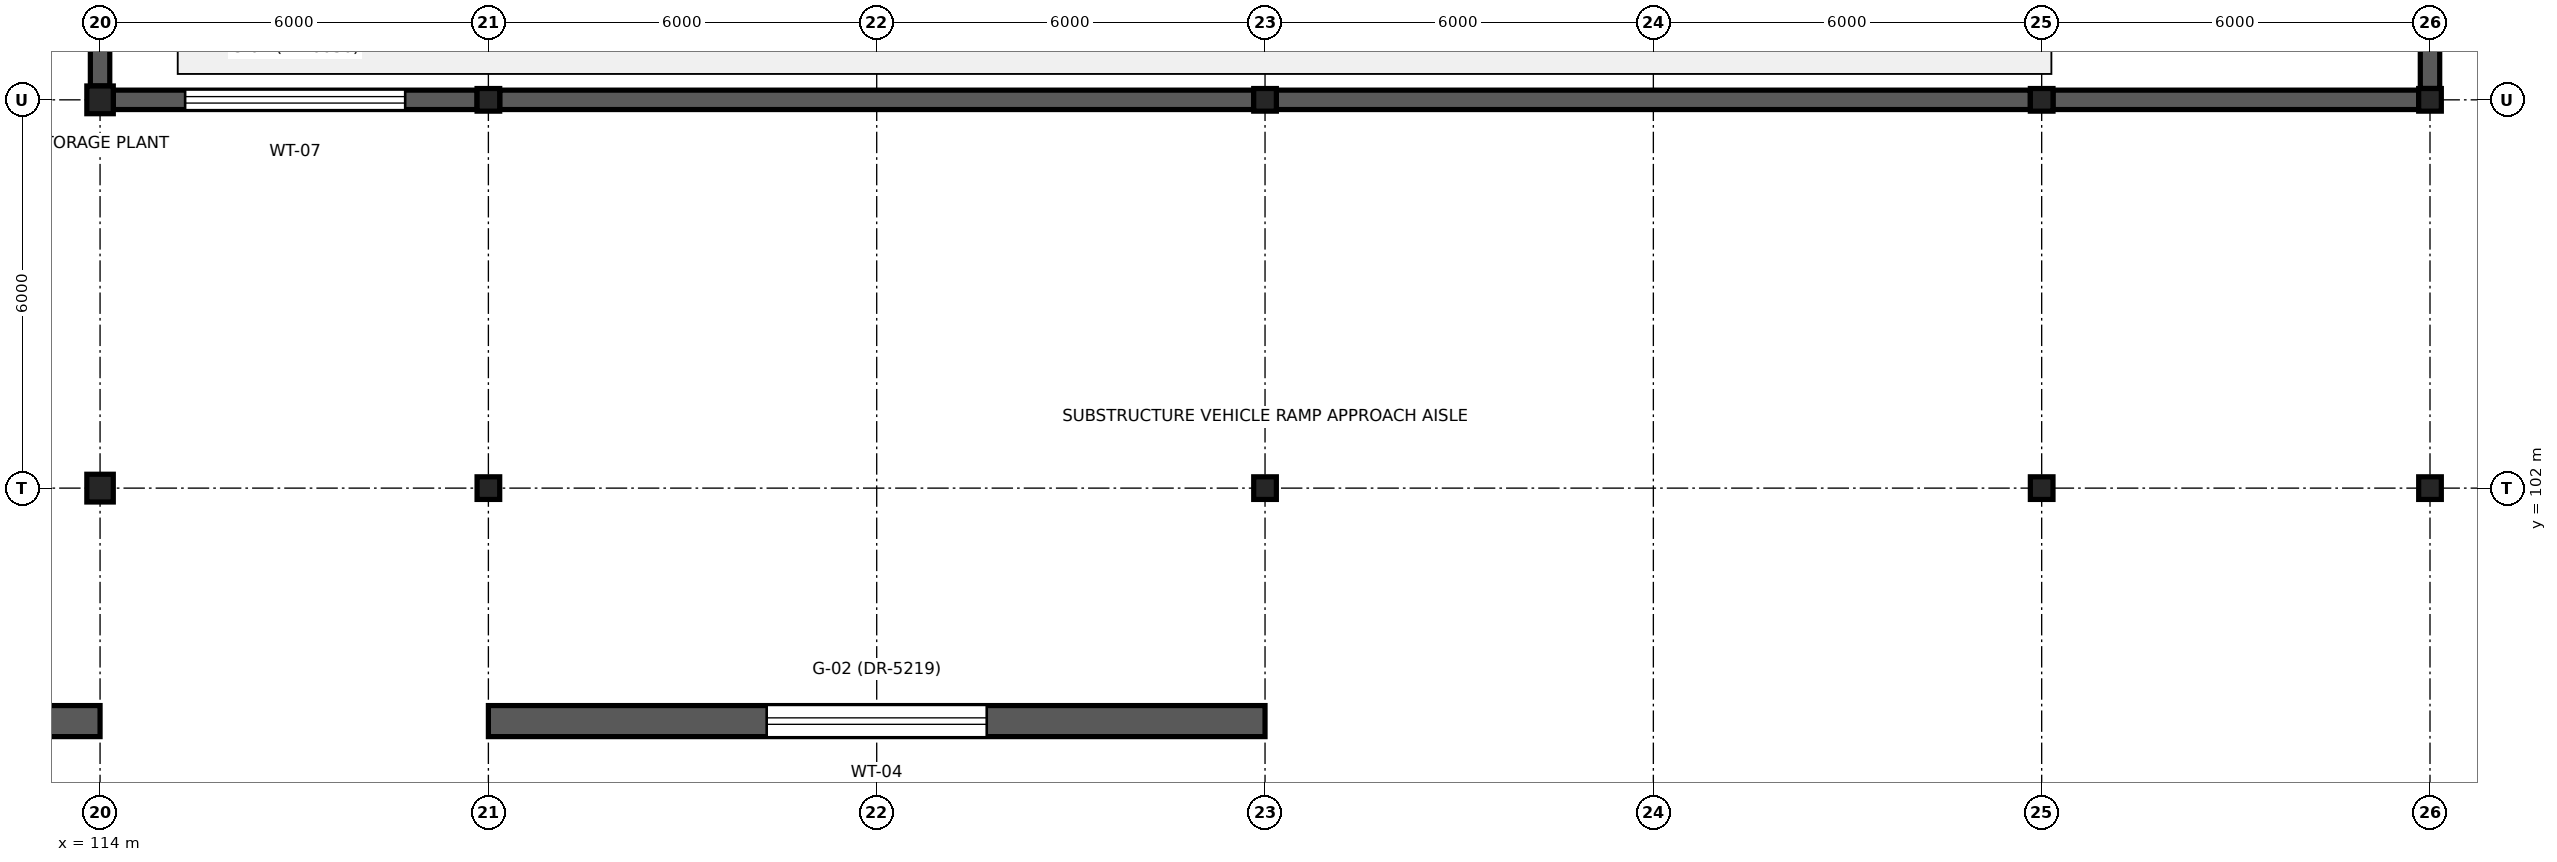
"""IFC4 building model, lengths in metres.
Left out: names, types, materials, properties, quantities, classifications, styles, units other than length and angle.
Written with IfcOpenShell. Run it as: python <this file> out.ifc"""

import sys

from ifc_helpers import new_model, si_unit, direction, frame, frame_2d, origin, origin_2d, place, context, subcontext, project, spatial, rectangle, i_section, extrude, element, fill, save


model = new_model("IFC4")
c1 = context("Model", 3, precision=1e-05, world=origin(), true_north=direction((0.0, 1.0)))
c2 = subcontext(c1, "Body", "Model", "MODEL_VIEW")
j1 = project(units=[si_unit("LENGTHUNIT", "METRE"), si_unit("PLANEANGLEUNIT", "RADIAN")], contexts=[c1])
p1 = place(None, origin())
s1 = spatial("IfcSite", under=j1, at=p1, CompositionType="ELEMENT")
p2 = place(p1, origin())
s2 = spatial("IfcBuilding", under=s1, at=p2, CompositionType="ELEMENT")
p3 = place(p2, frame((0.0, 0.0, -4.8)))
s3 = spatial("IfcBuildingStorey", under=s2, at=p3, CompositionType="ELEMENT", Elevation=-4.8)
p4 = place(p3, frame((114.0, 102.0, 0.0), z_axis=(0.0, 0.0, 1.0), x_axis=(1.0, 0.0, 0.0)))
e1 = element("IfcColumn", 1, at=p4, inside=s3, PredefinedType="COLUMN", context=c2, shape_type="SweptSolid", body=[
    extrude(i_section(OverallWidth=0.409, OverallDepth=0.429, WebThickness=0.024, FlangeThickness=0.035, FilletRadius=0.022, at=origin_2d()), origin(), (0.0, 0.0, 1.0), 4.8),
])
for number, where, z_axis, x_axis in (
    (2, (120.0, 102.0, 0.0), (0.0, 0.0, 1.0), (1.0, 0.0, 0.0)),
    (3, (132.0, 102.0, 0.0), (0.0, 0.0, 1.0), (1.0, 0.0, 0.0)),
    (4, (144.0, 102.0, 0.0), (0.0, 0.0, 1.0), (1.0, 0.0, 0.0)),
    (5, (150.0, 102.0, 0.0), (0.0, 0.0, 1.0), (1.0, 0.0, 0.0)),
):
    element("IfcColumn", number, at=place(p3, frame(where, z_axis=z_axis, x_axis=x_axis)), inside=s3, PredefinedType="COLUMN", context=c2, shape_type="SweptSolid", body=[
        extrude(i_section(OverallWidth=0.35, OverallDepth=0.35, WebThickness=0.012, FlangeThickness=0.019, FilletRadius=0.02, at=origin_2d()), origin(), (0.0, 0.0, 1.0), 4.8),
    ])
p5 = place(p3, frame((114.0, 108.0, 0.0), z_axis=(0.0, 0.0, 1.0), x_axis=(1.0, 0.0, 0.0)))
e6 = element("IfcColumn", 6, at=p5, inside=s3, PredefinedType="COLUMN", context=c2, shape_type="SweptSolid", body=[
    extrude(i_section(OverallWidth=0.409, OverallDepth=0.429, WebThickness=0.024, FlangeThickness=0.035, FilletRadius=0.022, at=origin_2d()), origin(), (0.0, 0.0, 1.0), 4.8),
])
for number, where, z_axis, x_axis in (
    (7, (120.0, 108.0, 0.0), (0.0, 0.0, 1.0), (1.0, 0.0, 0.0)),
    (8, (132.0, 108.0, 0.0), (0.0, 0.0, 1.0), (1.0, 0.0, 0.0)),
    (9, (144.0, 108.0, 0.0), (0.0, 0.0, 1.0), (1.0, 0.0, 0.0)),
    (10, (150.0, 108.0, 0.0), (0.0, 0.0, 1.0), (1.0, 0.0, 0.0)),
):
    element("IfcColumn", number, at=place(p3, frame(where, z_axis=z_axis, x_axis=x_axis)), inside=s3, PredefinedType="COLUMN", context=c2, shape_type="SweptSolid", body=[
        extrude(i_section(OverallWidth=0.35, OverallDepth=0.35, WebThickness=0.012, FlangeThickness=0.019, FilletRadius=0.02, at=origin_2d()), origin(), (0.0, 0.0, 1.0), 4.8),
    ])
p6 = place(p3, frame((114.205, 108.0, 0.0), z_axis=(0.0, 0.0, 1.0), x_axis=(1.0, 0.0, 0.0)))
e11 = element("IfcWall", 11, at=p6, inside=s3, PredefinedType="SHEAR", context=c2, shape_type="SweptSolid", body=[
    extrude(rectangle(XDim=5.62, YDim=0.3, at=frame_2d((2.81, 0.0))), origin(), (0.0, 0.0, 1.0), 4.48),
])
p7 = place(p6, frame((1.11, 0.0, 0.0)))
e12 = element("IfcOpeningElement", 12, at=p7, cuts=e11, PredefinedType="OPENING", context=c2, shape_type="SweptSolid", body=[
    extrude(rectangle(XDim=3.4, YDim=3.1, at=frame_2d((1.7, 1.55))), frame((0.0, 0.165, 0.0), z_axis=(0.0, -1.0, 0.0), x_axis=(1.0, 0.0, 0.0)), (0.0, 0.0, 1.0), 0.33),
])
for number, where, z_axis, x_axis in (
    (13, (120.175, 108.0, 0.0), (0.0, 0.0, 1.0), (1.0, 0.0, 0.0)),
    (14, (132.175, 108.0, 0.0), (0.0, 0.0, 1.0), (1.0, 0.0, 0.0)),
):
    element("IfcWall", number, at=place(p3, frame(where, z_axis=z_axis, x_axis=x_axis)), inside=s3, PredefinedType="SHEAR", context=c2, shape_type="SweptSolid", body=[
        extrude(rectangle(XDim=11.65, YDim=0.3, at=frame_2d((5.825, 0.0))), origin(), (0.0, 0.0, 1.0), 4.48),
    ])
p8 = place(p3, frame((144.175, 108.0, 0.0), z_axis=(0.0, 0.0, 1.0), x_axis=(1.0, 0.0, 0.0)))
e15 = element("IfcWall", 15, at=p8, inside=s3, PredefinedType="SHEAR", context=c2, shape_type="SweptSolid", body=[
    extrude(rectangle(XDim=5.65, YDim=0.3, at=frame_2d((2.825, 0.0))), origin(), (0.0, 0.0, 1.0), 4.48),
])
p9 = place(p3, frame((114.0, 108.215, 0.0), z_axis=(0.0, 0.0, 1.0), x_axis=(0.0, 1.0, 0.0)))
e16 = element("IfcWall", 16, at=p9, inside=s3, PredefinedType="SHEAR", context=c2, shape_type="SweptSolid", body=[
    extrude(rectangle(XDim=5.435, YDim=0.3, at=frame_2d((2.718, 0.0))), origin(), (0.0, 0.0, 1.0), 4.48),
])
p10 = place(p3, frame((150.0, 108.175, 0.0), z_axis=(0.0, 0.0, 1.0), x_axis=(0.0, 1.0, 0.0)))
e17 = element("IfcWall", 17, at=p10, inside=s3, PredefinedType="SHEAR", context=c2, shape_type="SweptSolid", body=[
    extrude(rectangle(XDim=5.475, YDim=0.3, at=frame_2d((2.737, 0.0))), origin(), (0.0, 0.0, 1.0), 4.48),
])
p11 = place(p3, frame((102.0, 98.4, 0.0), z_axis=(0.0, 0.0, 1.0), x_axis=(1.0, 0.0, 0.0)))
e18 = element("IfcWall", 18, at=p11, inside=s3, PredefinedType="SHEAR", context=c2, shape_type="SweptSolid", body=[
    extrude(rectangle(XDim=12.0, YDim=0.48, at=frame_2d((6.0, 0.0))), origin(), (0.0, 0.0, 1.0), 4.48),
])
p12 = place(p11, frame((5.2, 0.0, 0.0)))
e19 = element("IfcOpeningElement", 19, at=p12, cuts=e18, PredefinedType="OPENING", context=c2, shape_type="SweptSolid", body=[
    extrude(rectangle(XDim=1.6, YDim=2.25, at=frame_2d((0.8, 1.125))), frame((0.0, 0.255, 0.0), z_axis=(0.0, -1.0, 0.0), x_axis=(1.0, 0.0, 0.0)), (0.0, 0.0, 1.0), 0.51),
])
p13 = place(p3, frame((120.0, 98.4, 0.0), z_axis=(0.0, 0.0, 1.0), x_axis=(1.0, 0.0, 0.0)))
e20 = element("IfcWall", 20, at=p13, inside=s3, PredefinedType="SHEAR", context=c2, shape_type="SweptSolid", body=[
    extrude(rectangle(XDim=12.0, YDim=0.48, at=frame_2d((6.0, 0.0))), origin(), (0.0, 0.0, 1.0), 4.48),
])
p14 = place(p13, frame((4.3, 0.0, 0.0)))
e21 = element("IfcOpeningElement", 21, at=p14, cuts=e20, PredefinedType="OPENING", context=c2, shape_type="SweptSolid", body=[
    extrude(rectangle(XDim=3.4, YDim=3.1, at=frame_2d((1.7, 1.55))), frame((0.0, 0.255, 0.0), z_axis=(0.0, -1.0, 0.0), x_axis=(1.0, 0.0, 0.0)), (0.0, 0.0, 1.0), 0.51),
])
p15 = place(p7, origin())
e22 = element("IfcDoor", 22, at=p15, inside=s3, OperationType="ROLLINGUP", PredefinedType="GATE", context=c2, shape_type="SweptSolid", body=[
    extrude(rectangle(XDim=3.4, YDim=3.1, at=frame_2d((1.7, 1.55))), frame((0.0, 0.025, 0.0), z_axis=(0.0, -1.0, 0.0), x_axis=(1.0, 0.0, 0.0)), (0.0, 0.0, 1.0), 0.05),
])
fill(e12, e22)
p16 = place(p14, origin())
e23 = element("IfcDoor", 23, at=p16, inside=s3, OperationType="ROLLINGUP", PredefinedType="GATE", context=c2, shape_type="SweptSolid", body=[
    extrude(rectangle(XDim=3.4, YDim=3.1, at=frame_2d((1.7, 1.55))), frame((0.0, 0.025, 0.0), z_axis=(0.0, -1.0, 0.0), x_axis=(1.0, 0.0, 0.0)), (0.0, 0.0, 1.0), 0.05),
])
fill(e21, e23)
save(model, sys.argv[1])
